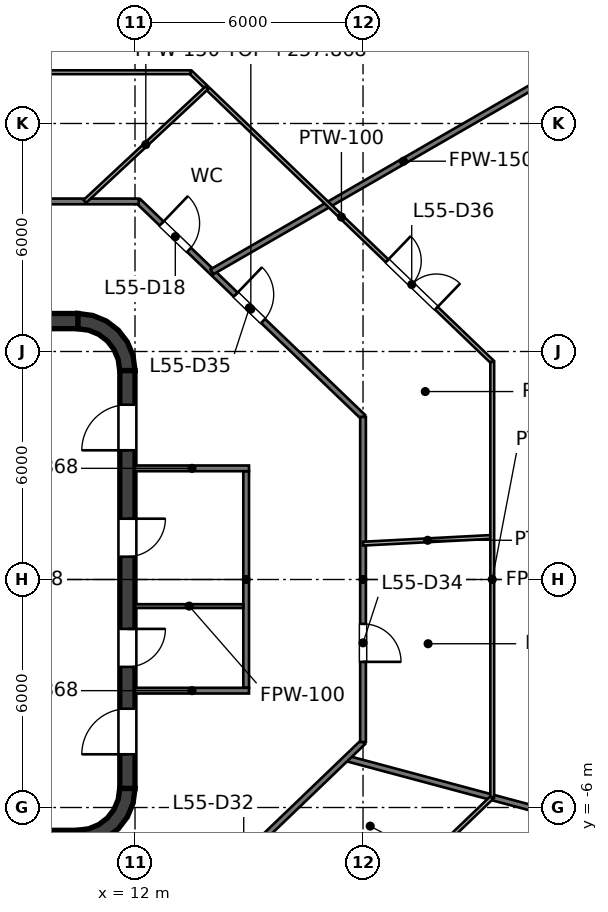
"""IFC4 building model, lengths in metres.
Left out: names, types, materials, properties, quantities, classifications, styles, units other than length and angle.
Written with IfcOpenShell. Run it as: python <this file> out.ifc"""

import sys

from ifc_helpers import new_model, si_unit, direction, frame, frame_2d, origin, place, context, subcontext, project, spatial, polyline, rectangle, outline, extrude, element, fill, save


model = new_model("IFC4")
c1 = context("Model", 3, precision=1e-05, world=origin(), true_north=direction((0.0, 1.0)))
c2 = subcontext(c1, "Body", "Model", "MODEL_VIEW")
j1 = project(units=[si_unit("LENGTHUNIT", "METRE"), si_unit("PLANEANGLEUNIT", "RADIAN")], contexts=[c1])
p1 = place(None, origin())
s1 = spatial("IfcSite", under=j1, at=p1, CompositionType="ELEMENT")
p2 = place(p1, origin())
s2 = spatial("IfcBuilding", under=s1, at=p2, CompositionType="ELEMENT")
p3 = place(p2, frame((0.0, 0.0, 255.0)))
s3 = spatial("IfcBuildingStorey", under=s2, at=p3, CompositionType="ELEMENT", Elevation=255.0)
for number, where, z_axis, x_axis in (
    (1, (-10.5, 6.8, 0.0), (0.0, 0.0, 1.0), (1.0, 0.0, 0.0)),
    (2, (-10.5, -6.8, 0.0), (0.0, 0.0, 1.0), (1.0, 0.0, 0.0)),
):
    element("IfcWall", number, at=place(p3, frame(where, z_axis=z_axis, x_axis=x_axis)), inside=s3, PredefinedType="SHEAR", context=c2, shape_type="SweptSolid", body=[
        extrude(rectangle(XDim=21.0, YDim=0.4, at=frame_2d((10.5, 0.0))), origin(), (0.0, 0.0, 1.0), 4.0),
    ])
p4 = place(p3, frame((11.8, -5.5, 0.0), z_axis=(0.0, 0.0, 1.0), x_axis=(0.0, 1.0, 0.0)))
e3 = element("IfcWall", 3, at=p4, inside=s3, PredefinedType="SHEAR", context=c2, shape_type="SweptSolid", body=[
    extrude(rectangle(XDim=11.0, YDim=0.4, at=frame_2d((5.5, 0.0))), origin(), (0.0, 0.0, 1.0), 4.0),
])
p5 = place(p4, frame((3.2, 0.0, 0.0)))
e4 = element("IfcOpeningElement", 4, at=p5, cuts=e3, PredefinedType="OPENING", context=c2, shape_type="SweptSolid", body=[
    extrude(rectangle(XDim=1.0, YDim=2.1, at=frame_2d((0.5, 1.05))), frame((0.0, 0.2, 0.0), z_axis=(0.0, -1.0, 0.0), x_axis=(1.0, 0.0, 0.0)), (0.0, 0.0, 1.0), 0.4),
])
p6 = place(p4, frame((6.1, 0.0, 0.0)))
e5 = element("IfcOpeningElement", 5, at=p6, cuts=e3, PredefinedType="OPENING", context=c2, shape_type="SweptSolid", body=[
    extrude(rectangle(XDim=1.0, YDim=2.1, at=frame_2d((0.5, 1.05))), frame((0.0, 0.2, 0.0), z_axis=(0.0, -1.0, 0.0), x_axis=(1.0, 0.0, 0.0)), (0.0, 0.0, 1.0), 0.4),
])
p7 = place(p4, frame((0.9, 0.0, 0.0)))
e6 = element("IfcOpeningElement", 6, at=p7, cuts=e3, PredefinedType="OPENING", context=c2, shape_type="SweptSolid", body=[
    extrude(rectangle(XDim=1.2, YDim=2.1, at=frame_2d((0.6, 1.05))), frame((0.0, 0.2, 0.0), z_axis=(0.0, -1.0, 0.0), x_axis=(1.0, 0.0, 0.0)), (0.0, 0.0, 1.0), 0.4),
])
p8 = place(p4, frame((8.9, 0.0, 0.0)))
e7 = element("IfcOpeningElement", 7, at=p8, cuts=e3, PredefinedType="OPENING", context=c2, shape_type="SweptSolid", body=[
    extrude(rectangle(XDim=1.2, YDim=2.1, at=frame_2d((0.6, 1.05))), frame((0.0, 0.2, 0.0), z_axis=(0.0, -1.0, 0.0), x_axis=(1.0, 0.0, 0.0)), (0.0, 0.0, 1.0), 0.4),
])
p9 = place(p3, origin())
e8 = element("IfcWall", 8, at=p9, inside=s3, PredefinedType="SHEAR", context=c2, shape_type="SweptSolid", body=[
    extrude(outline(polyline([(10.5, 7.0), (10.5, 6.596), (10.784, 6.559), (11.048, 6.45), (11.275, 6.275), (11.45, 6.048), (11.559, 5.784), (11.596, 5.5), (12.0, 5.5), (11.949, 5.888), (11.799, 6.25), (11.561, 6.561), (11.25, 6.799), (10.888, 6.949), (10.5, 7.0)])), origin(), (0.0, 0.0, 1.0), 4.0),
])
e9 = element("IfcWall", 9, at=p9, inside=s3, PredefinedType="SHEAR", context=c2, shape_type="SweptSolid", body=[
    extrude(outline(polyline([(12.0, -5.5), (11.596, -5.5), (11.559, -5.784), (11.45, -6.048), (11.275, -6.275), (11.048, -6.45), (10.784, -6.559), (10.5, -6.596), (10.5, -7.0), (10.888, -6.949), (11.25, -6.799), (11.561, -6.561), (11.799, -6.25), (11.949, -5.888), (12.0, -5.5)])), origin(), (0.0, 0.0, 1.0), 4.0),
])
p10 = place(p3, frame((14.925, -2.85, 0.0), z_axis=(0.0, 0.0, 1.0), x_axis=(0.0, 1.0, 0.0)))
e10 = element("IfcWall", 10, at=p10, inside=s3, PredefinedType="PARTITIONING", context=c2, shape_type="SweptSolid", body=[
    extrude(rectangle(XDim=5.7, YDim=0.15, at=frame_2d((2.85, 0.0))), origin(), (0.0, 0.0, 1.0), 2.868),
])
for number, where, z_axis, x_axis in (
    (11, (12.0, 2.925, 0.0), (0.0, 0.0, 1.0), (1.0, 0.0, 0.0)),
    (12, (12.0, -2.925, 0.0), (0.0, 0.0, 1.0), (1.0, 0.0, 0.0)),
):
    element("IfcWall", number, at=place(p3, frame(where, z_axis=z_axis, x_axis=x_axis)), inside=s3, PredefinedType="PARTITIONING", context=c2, shape_type="SweptSolid", body=[
        extrude(rectangle(XDim=3.0, YDim=0.15, at=frame_2d((1.5, 0.0))), origin(), (0.0, 0.0, 1.0), 2.868),
    ])
p11 = place(p3, frame((12.0, -0.7, 0.0), z_axis=(0.0, 0.0, 1.0), x_axis=(1.0, 0.0, 0.0)))
e13 = element("IfcWall", 13, at=p11, inside=s3, PredefinedType="PARTITIONING", context=c2, shape_type="SweptSolid", body=[
    extrude(rectangle(XDim=2.85, YDim=0.1, at=frame_2d((1.425, 0.0))), origin(), (0.0, 0.0, 1.0), 2.868),
])
p12 = place(p3, frame((12.095, 9.949, 0.0), z_axis=(0.0, 0.0, 1.0), x_axis=(0.721290181137, -0.692633001376, 0.0)))
e14 = element("IfcWall", 14, at=p12, inside=s3, PredefinedType="PARTITIONING", context=c2, shape_type="SweptSolid", body=[
    extrude(rectangle(XDim=8.187, YDim=0.15, at=frame_2d((4.094, 0.0))), origin(), (0.0, 0.0, 1.0), 2.868),
])
p13 = place(p12, frame((0.839, 0.0, 0.0)))
e15 = element("IfcOpeningElement", 15, at=p13, cuts=e14, PredefinedType="OPENING", context=c2, shape_type="SweptSolid", body=[
    extrude(rectangle(XDim=1.0, YDim=2.1, at=frame_2d((0.5, 1.05))), frame((0.0, 0.075, 0.0), z_axis=(0.0, -1.0, 0.0), x_axis=(1.0, 0.0, 0.0)), (0.0, 0.0, 1.0), 0.15),
])
p14 = place(p12, frame((3.542, 0.0, 0.0)))
e16 = element("IfcOpeningElement", 16, at=p14, cuts=e14, PredefinedType="OPENING", context=c2, shape_type="SweptSolid", body=[
    extrude(rectangle(XDim=1.0, YDim=2.1, at=frame_2d((0.5, 1.05))), frame((0.0, 0.075, 0.0), z_axis=(0.0, -1.0, 0.0), x_axis=(1.0, 0.0, 0.0)), (0.0, 0.0, 1.0), 0.15),
])
p15 = place(p3, frame((17.556, -4.704, 0.0), z_axis=(0.0, 0.0, 1.0), x_axis=(0.9659158877, -0.258856133573, 0.0)))
e17 = element("IfcWall", 17, at=p15, inside=s3, PredefinedType="PARTITIONING", context=c2, shape_type="SweptSolid", body=[
    extrude(rectangle(XDim=11.521, YDim=0.15, at=frame_2d((5.76, 0.0))), origin(), (0.0, 0.0, 1.0), 3.477),
])
p16 = place(p3, frame((-12.095, 9.949, 0.0), z_axis=(0.0, 0.0, 1.0), x_axis=(1.0, 0.0, 0.0)))
e18 = element("IfcWall", 18, at=p16, inside=s3, PredefinedType="PARTITIONING", context=c2, shape_type="SweptSolid", body=[
    extrude(rectangle(XDim=24.19, YDim=0.15, at=frame_2d((12.095, 0.0))), origin(), (0.0, 0.0, 1.0), 2.927),
])
p17 = place(p16, frame((16.933, 0.0, 0.0)))
e19 = element("IfcOpeningElement", 19, at=p17, cuts=e18, PredefinedType="OPENING", context=c2, shape_type="SweptSolid", body=[
    extrude(rectangle(XDim=1.0, YDim=2.1, at=frame_2d((0.5, 1.05))), frame((0.0, 0.075, 0.0), z_axis=(0.0, -1.0, 0.0), x_axis=(1.0, 0.0, 0.0)), (0.0, 0.0, 1.0), 0.15),
])
p18 = place(p16, frame((10.255, 0.0, 0.0)))
e20 = element("IfcOpeningElement", 20, at=p18, cuts=e18, PredefinedType="OPENING", context=c2, shape_type="SweptSolid", body=[
    extrude(rectangle(XDim=1.0, YDim=2.1, at=frame_2d((0.5, 1.05))), frame((0.0, 0.075, 0.0), z_axis=(0.0, -1.0, 0.0), x_axis=(1.0, 0.0, 0.0)), (0.0, 0.0, 1.0), 0.15),
])
p19 = place(p16, frame((6.978, 0.0, 0.0)))
e21 = element("IfcOpeningElement", 21, at=p19, cuts=e18, PredefinedType="OPENING", context=c2, shape_type="SweptSolid", body=[
    extrude(rectangle(XDim=1.0, YDim=2.1, at=frame_2d((0.5, 1.05))), frame((0.0, 0.075, 0.0), z_axis=(0.0, -1.0, 0.0), x_axis=(1.0, 0.0, 0.0)), (0.0, 0.0, 1.0), 0.15),
])
p20 = place(p16, frame((2.317, 0.0, 0.0)))
e22 = element("IfcOpeningElement", 22, at=p20, cuts=e18, PredefinedType="OPENING", context=c2, shape_type="SweptSolid", body=[
    extrude(rectangle(XDim=1.0, YDim=2.1, at=frame_2d((0.5, 1.05))), frame((0.0, 0.075, 0.0), z_axis=(0.0, -1.0, 0.0), x_axis=(1.0, 0.0, 0.0)), (0.0, 0.0, 1.0), 0.15),
])
p21 = place(p3, frame((14.024, 8.097, 0.0), z_axis=(0.0, 0.0, 1.0), x_axis=(0.866019681863, 0.500009910528, 0.0)))
e23 = element("IfcWall", 23, at=p21, inside=s3, PredefinedType="PARTITIONING", context=c2, shape_type="SweptSolid", body=[
    extrude(rectangle(XDim=11.64, YDim=0.15, at=frame_2d((5.82, 0.0))), origin(), (0.0, 0.0, 1.0), 3.076),
])
p22 = place(p3, frame((12.095, -9.949, 0.0), z_axis=(0.0, 0.0, 1.0), x_axis=(0.721348586031, 0.692572174889, 0.0)))
e24 = element("IfcWall", 24, at=p22, inside=s3, PredefinedType="PARTITIONING", context=c2, shape_type="SweptSolid", body=[
    extrude(rectangle(XDim=8.187, YDim=0.15, at=frame_2d((4.094, 0.0))), origin(), (0.0, 0.0, 1.0), 2.868),
])
p23 = place(p22, frame((3.334, 0.0, 0.0)))
e25 = element("IfcOpeningElement", 25, at=p23, cuts=e24, PredefinedType="OPENING", context=c2, shape_type="SweptSolid", body=[
    extrude(rectangle(XDim=1.0, YDim=2.1, at=frame_2d((0.5, 1.05))), frame((0.0, 0.075, 0.0), z_axis=(0.0, -1.0, 0.0), x_axis=(1.0, 0.0, 0.0)), (0.0, 0.0, 1.0), 0.15),
])
p24 = place(p3, frame((18.0, -4.278, 0.0), z_axis=(0.0, 0.0, 1.0), x_axis=(0.0, 1.0, 0.0)))
e26 = element("IfcWall", 26, at=p24, inside=s3, PredefinedType="PARTITIONING", context=c2, shape_type="SweptSolid", body=[
    extrude(rectangle(XDim=8.556, YDim=0.15, at=frame_2d((4.278, 0.0))), origin(), (0.0, 0.0, 1.0), 2.868),
])
p25 = place(p24, frame((2.111, 0.0, 0.0)))
e27 = element("IfcOpeningElement", 27, at=p25, cuts=e26, PredefinedType="OPENING", context=c2, shape_type="SweptSolid", body=[
    extrude(rectangle(XDim=1.0, YDim=2.1, at=frame_2d((0.5, 1.05))), frame((0.0, 0.075, 0.0), z_axis=(0.0, -1.0, 0.0), x_axis=(1.0, 0.0, 0.0)), (0.0, 0.0, 1.0), 0.15),
])
p26 = place(p3, frame((13.463, 13.349, 0.0), z_axis=(0.0, 0.0, 1.0), x_axis=(0.721293766873, -0.692629267264, 0.0)))
e28 = element("IfcWall", 28, at=p26, inside=s3, PredefinedType="PARTITIONING", context=c2, shape_type="SweptSolid", body=[
    extrude(rectangle(XDim=11.004, YDim=0.1, at=frame_2d((5.502, 0.0))), origin(), (0.0, 0.0, 1.0), 2.927),
])
p27 = place(p26, frame((7.166, 0.0, 0.0)))
e29 = element("IfcOpeningElement", 29, at=p27, cuts=e28, PredefinedType="OPENING", context=c2, shape_type="SweptSolid", body=[
    extrude(rectangle(XDim=1.8, YDim=2.1, at=frame_2d((0.9, 1.05))), frame((0.0, 0.05, 0.0), z_axis=(0.0, -1.0, 0.0), x_axis=(1.0, 0.0, 0.0)), (0.0, 0.0, 1.0), 0.1),
])
p28 = place(p3, frame((-13.463, 13.349, 0.0), z_axis=(0.0, 0.0, 1.0), x_axis=(1.0, 0.0, 0.0)))
e30 = element("IfcWall", 30, at=p28, inside=s3, PredefinedType="PARTITIONING", context=c2, shape_type="SweptSolid", body=[
    extrude(rectangle(XDim=26.926, YDim=0.1, at=frame_2d((13.463, 0.0))), origin(), (0.0, 0.0, 1.0), 2.927),
])
p29 = place(p28, frame((19.31, 0.0, 0.0)))
e31 = element("IfcOpeningElement", 31, at=p29, cuts=e30, PredefinedType="OPENING", context=c2, shape_type="SweptSolid", body=[
    extrude(rectangle(XDim=1.8, YDim=2.1, at=frame_2d((0.9, 1.05))), frame((0.0, 0.05, 0.0), z_axis=(0.0, -1.0, 0.0), x_axis=(1.0, 0.0, 0.0)), (0.0, 0.0, 1.0), 0.1),
])
p30 = place(p3, frame((18.0, 0.943, 0.0), z_axis=(0.0, 0.0, 1.0), x_axis=(0.998632646467, 0.052276547413, 0.0)))
e32 = element("IfcWall", 32, at=p30, inside=s3, PredefinedType="PARTITIONING", context=c2, shape_type="SweptSolid", body=[
    extrude(rectangle(XDim=3.405, YDim=0.1, at=frame_2d((1.702, 0.0))), origin(), (0.0, 0.0, 1.0), 3.85),
])
p31 = place(p3, frame((10.679, 9.949, 0.0), z_axis=(0.0, 0.0, 1.0), x_axis=(0.731623098171, 0.681709353187, 0.0)))
e33 = element("IfcWall", 33, at=p31, inside=s3, PredefinedType="PARTITIONING", context=c2, shape_type="SweptSolid", body=[
    extrude(rectangle(XDim=4.387, YDim=0.1, at=frame_2d((2.194, 0.0))), origin(), (0.0, 0.0, 1.0), 3.85),
])
p32 = place(p3, frame((13.463, -13.349, 0.0), z_axis=(0.0, 0.0, 1.0), x_axis=(0.721271950356, 0.692651985942, 0.0)))
e34 = element("IfcWall", 34, at=p32, inside=s3, PredefinedType="PARTITIONING", context=c2, shape_type="SweptSolid", body=[
    extrude(rectangle(XDim=10.996, YDim=0.1, at=frame_2d((5.498, 0.0))), origin(), (0.0, 0.0, 1.0), 2.877),
])
p33 = place(p32, frame((4.547, 0.0, 0.0)))
e35 = element("IfcOpeningElement", 35, at=p33, cuts=e34, PredefinedType="OPENING", context=c2, shape_type="SweptSolid", body=[
    extrude(rectangle(XDim=1.8, YDim=2.1, at=frame_2d((0.9, 1.05))), frame((0.0, 0.05, 0.0), z_axis=(0.0, -1.0, 0.0), x_axis=(1.0, 0.0, 0.0)), (0.0, 0.0, 1.0), 0.1),
])
p34 = place(p3, frame((21.4, -5.727, 0.0), z_axis=(0.0, 0.0, 1.0), x_axis=(0.0, 1.0, 0.0)))
e36 = element("IfcWall", 36, at=p34, inside=s3, PredefinedType="PARTITIONING", context=c2, shape_type="SweptSolid", body=[
    extrude(rectangle(XDim=11.454, YDim=0.1, at=frame_2d((5.727, 0.0))), origin(), (0.0, 0.0, 1.0), 2.868),
])
p35 = place(p5, origin())
e37 = element("IfcDoor", 37, at=p35, inside=s3, OperationType="SINGLE_SWING_RIGHT", PredefinedType="DOOR", context=c2, shape_type="SweptSolid", body=[
    extrude(rectangle(XDim=1.0, YDim=2.1, at=frame_2d((0.5, 1.05))), frame((0.0, 0.025, 0.0), z_axis=(0.0, -1.0, 0.0), x_axis=(1.0, 0.0, 0.0)), (0.0, 0.0, 1.0), 0.05),
])
fill(e4, e37)
p36 = place(p6, origin())
e38 = element("IfcDoor", 38, at=p36, inside=s3, OperationType="SINGLE_SWING_RIGHT", PredefinedType="DOOR", context=c2, shape_type="SweptSolid", body=[
    extrude(rectangle(XDim=1.0, YDim=2.1, at=frame_2d((0.5, 1.05))), frame((0.0, 0.025, 0.0), z_axis=(0.0, -1.0, 0.0), x_axis=(1.0, 0.0, 0.0)), (0.0, 0.0, 1.0), 0.05),
])
fill(e5, e38)
p37 = place(p7, origin())
e39 = element("IfcDoor", 39, at=p37, inside=s3, OperationType="SINGLE_SWING_LEFT", PredefinedType="DOOR", context=c2, shape_type="SweptSolid", body=[
    extrude(rectangle(XDim=1.2, YDim=2.1, at=frame_2d((0.6, 1.05))), frame((0.0, 0.025, 0.0), z_axis=(0.0, -1.0, 0.0), x_axis=(1.0, 0.0, 0.0)), (0.0, 0.0, 1.0), 0.05),
])
fill(e6, e39)
p38 = place(p8, origin())
e40 = element("IfcDoor", 40, at=p38, inside=s3, OperationType="SINGLE_SWING_LEFT", PredefinedType="DOOR", context=c2, shape_type="SweptSolid", body=[
    extrude(rectangle(XDim=1.2, YDim=2.1, at=frame_2d((0.6, 1.05))), frame((0.0, 0.025, 0.0), z_axis=(0.0, -1.0, 0.0), x_axis=(1.0, 0.0, 0.0)), (0.0, 0.0, 1.0), 0.05),
])
fill(e7, e40)
p39 = place(p13, origin())
e41 = element("IfcDoor", 41, at=p39, inside=s3, OperationType="SINGLE_SWING_LEFT", PredefinedType="DOOR", context=c2, shape_type="SweptSolid", body=[
    extrude(rectangle(XDim=1.0, YDim=2.1, at=frame_2d((0.5, 1.05))), frame((0.0, 0.025, 0.0), z_axis=(0.0, -1.0, 0.0), x_axis=(1.0, 0.0, 0.0)), (0.0, 0.0, 1.0), 0.05),
])
fill(e15, e41)
p40 = place(p25, origin())
e42 = element("IfcDoor", 42, at=p40, inside=s3, OperationType="SINGLE_SWING_LEFT", PredefinedType="DOOR", context=c2, shape_type="SweptSolid", body=[
    extrude(rectangle(XDim=1.0, YDim=2.1, at=frame_2d((0.5, 1.05))), frame((0.0, 0.025, 0.0), z_axis=(0.0, -1.0, 0.0), x_axis=(1.0, 0.0, 0.0)), (0.0, 0.0, 1.0), 0.05),
])
fill(e27, e42)
p41 = place(p14, origin())
e43 = element("IfcDoor", 43, at=p41, inside=s3, OperationType="SINGLE_SWING_LEFT", PredefinedType="DOOR", context=c2, shape_type="SweptSolid", body=[
    extrude(rectangle(XDim=1.0, YDim=2.1, at=frame_2d((0.5, 1.05))), frame((0.0, 0.025, 0.0), z_axis=(0.0, -1.0, 0.0), x_axis=(1.0, 0.0, 0.0)), (0.0, 0.0, 1.0), 0.05),
])
fill(e16, e43)
p42 = place(p27, origin())
e44 = element("IfcDoor", 44, at=p42, inside=s3, OperationType="DOUBLE_DOOR_SINGLE_SWING", PredefinedType="DOOR", context=c2, shape_type="SweptSolid", body=[
    extrude(rectangle(XDim=1.8, YDim=2.1, at=frame_2d((0.9, 1.05))), frame((0.0, 0.025, 0.0), z_axis=(0.0, -1.0, 0.0), x_axis=(1.0, 0.0, 0.0)), (0.0, 0.0, 1.0), 0.05),
])
fill(e29, e44)
save(model, sys.argv[1])
